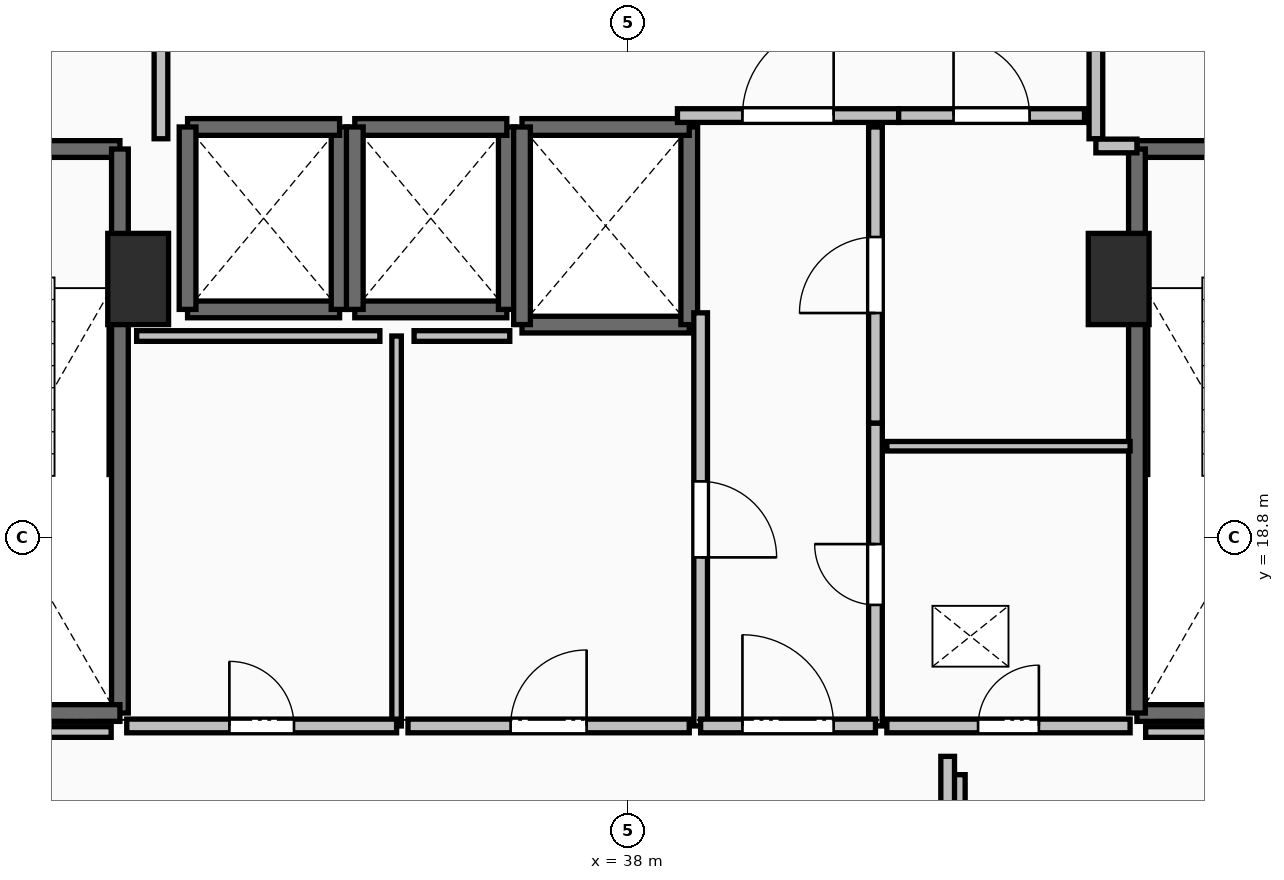
"""IFC4 building model, lengths in metres.
Left out: names, types, materials, properties, quantities, classifications, styles, units other than length and angle.
Written with IfcOpenShell. Run it as: python <this file> out.ifc"""

import sys

from ifc_helpers import new_model, si_unit, direction, frame, frame_2d, origin, origin_2d, place, context, subcontext, project, spatial, rectangle, extrude, element, fill, save


model = new_model("IFC4")
c1 = context("Model", 3, precision=1e-05, world=origin(), true_north=direction((0.0, 1.0)))
c2 = subcontext(c1, "Body", "Model", "MODEL_VIEW")
j1 = project(units=[si_unit("LENGTHUNIT", "METRE"), si_unit("PLANEANGLEUNIT", "RADIAN")], contexts=[c1])
p1 = place(None, origin())
s1 = spatial("IfcSite", under=j1, at=p1, CompositionType="ELEMENT")
p2 = place(p1, origin())
s2 = spatial("IfcBuilding", under=s1, at=p2, CompositionType="ELEMENT")
p3 = place(p2, frame((0.0, 0.0, 45.0)))
s3 = spatial("IfcBuildingStorey", under=s2, at=p3, CompositionType="ELEMENT", Elevation=45.0)
for number, where, z_axis, x_axis in (
    (1, (31.55, 22.2, 0.0), (0.0, 0.0, 1.0), (1.0, 0.0, 0.0)),
    (2, (44.45, 22.2, 0.0), (0.0, 0.0, 1.0), (1.0, 0.0, 0.0)),
):
    element("IfcColumn", number, at=place(p3, frame(where, z_axis=z_axis, x_axis=x_axis)), inside=s3, PredefinedType="PILASTER", context=c2, shape_type="SweptSolid", body=[
        extrude(rectangle(XDim=0.8, YDim=1.2, at=origin_2d()), origin(), (0.0, 0.0, 1.0), 3.5),
    ])
p4 = place(p3, frame((27.94, 23.91, 0.0), z_axis=(0.0, 0.0, 1.0), x_axis=(1.0, 0.0, 0.0)))
e3 = element("IfcWall", 3, at=p4, inside=s3, PredefinedType="SOLIDWALL", context=c2, shape_type="SweptSolid", body=[
    extrude(rectangle(XDim=3.37, YDim=0.22, at=frame_2d((1.685, 0.0))), origin(), (0.0, 0.0, 1.0), 3.24),
])
p5 = place(p4, frame((1.135, 0.0, 0.0)))
e4 = element("IfcOpeningElement", 4, at=p5, cuts=e3, PredefinedType="OPENING", context=c2, shape_type="SweptSolid", body=[
    extrude(rectangle(XDim=1.1, YDim=2.15, at=frame_2d((0.55, 1.075))), frame((0.0, 0.125, 0.0), z_axis=(0.0, -1.0, 0.0), x_axis=(1.0, 0.0, 0.0)), (0.0, 0.0, 1.0), 0.25),
])
p6 = place(p3, frame((31.31, 23.91, 0.0), z_axis=(0.0, 0.0, 1.0), x_axis=(0.0, -1.0, 0.0)))
e5 = element("IfcWall", 5, at=p6, inside=s3, PredefinedType="SOLIDWALL", context=c2, shape_type="SweptSolid", body=[
    extrude(rectangle(XDim=7.42, YDim=0.22, at=frame_2d((3.71, 0.0))), origin(), (0.0, 0.0, 1.0), 3.24),
])
p7 = place(p3, frame((31.31, 16.49, 0.0), z_axis=(0.0, 0.0, 1.0), x_axis=(-1.0, 0.0, 0.0)))
e6 = element("IfcWall", 6, at=p7, inside=s3, PredefinedType="SOLIDWALL", context=c2, shape_type="SweptSolid", body=[
    extrude(rectangle(XDim=3.37, YDim=0.22, at=frame_2d((1.685, 0.0))), origin(), (0.0, 0.0, 1.0), 3.24),
])
p8 = place(p3, frame((44.69, 23.91, 0.0), z_axis=(0.0, 0.0, 1.0), x_axis=(1.0, 0.0, 0.0)))
e7 = element("IfcWall", 7, at=p8, inside=s3, PredefinedType="SOLIDWALL", context=c2, shape_type="SweptSolid", body=[
    extrude(rectangle(XDim=3.37, YDim=0.22, at=frame_2d((1.685, 0.0))), origin(), (0.0, 0.0, 1.0), 3.24),
])
p9 = place(p8, frame((1.135, 0.0, 0.0)))
e8 = element("IfcOpeningElement", 8, at=p9, cuts=e7, PredefinedType="OPENING", context=c2, shape_type="SweptSolid", body=[
    extrude(rectangle(XDim=1.1, YDim=2.15, at=frame_2d((0.55, 1.075))), frame((0.0, 0.125, 0.0), z_axis=(0.0, -1.0, 0.0), x_axis=(1.0, 0.0, 0.0)), (0.0, 0.0, 1.0), 0.25),
])
p10 = place(p3, frame((48.06, 16.49, 0.0), z_axis=(0.0, 0.0, 1.0), x_axis=(-1.0, 0.0, 0.0)))
e9 = element("IfcWall", 9, at=p10, inside=s3, PredefinedType="SOLIDWALL", context=c2, shape_type="SweptSolid", body=[
    extrude(rectangle(XDim=3.37, YDim=0.22, at=frame_2d((1.685, 0.0))), origin(), (0.0, 0.0, 1.0), 3.24),
])
p11 = place(p3, frame((44.69, 16.49, 0.0), z_axis=(0.0, 0.0, 1.0), x_axis=(0.0, 1.0, 0.0)))
e10 = element("IfcWall", 10, at=p11, inside=s3, PredefinedType="SOLIDWALL", context=c2, shape_type="SweptSolid", body=[
    extrude(rectangle(XDim=7.42, YDim=0.22, at=frame_2d((3.71, 0.0))), origin(), (0.0, 0.0, 1.0), 3.24),
])
p12 = place(p3, frame((32.2, 21.8, 0.0), z_axis=(0.0, 0.0, 1.0), x_axis=(1.0, 0.0, 0.0)))
e11 = element("IfcWall", 11, at=p12, inside=s3, PredefinedType="SOLIDWALL", context=c2, shape_type="SweptSolid", body=[
    extrude(rectangle(XDim=2.0, YDim=0.22, at=frame_2d((1.0, 0.0))), origin(), (0.0, 0.0, 1.0), 3.24),
])
p13 = place(p3, frame((34.2, 21.8, 0.0), z_axis=(0.0, 0.0, 1.0), x_axis=(0.0, 1.0, 0.0)))
e12 = element("IfcWall", 12, at=p13, inside=s3, PredefinedType="SOLIDWALL", context=c2, shape_type="SweptSolid", body=[
    extrude(rectangle(XDim=2.4, YDim=0.22, at=frame_2d((1.2, 0.0))), origin(), (0.0, 0.0, 1.0), 3.24),
])
p14 = place(p3, frame((34.2, 24.2, 0.0), z_axis=(0.0, 0.0, 1.0), x_axis=(-1.0, 0.0, 0.0)))
e13 = element("IfcWall", 13, at=p14, inside=s3, PredefinedType="SOLIDWALL", context=c2, shape_type="SweptSolid", body=[
    extrude(rectangle(XDim=2.0, YDim=0.22, at=frame_2d((1.0, 0.0))), origin(), (0.0, 0.0, 1.0), 3.24),
])
p15 = place(p3, frame((32.2, 24.2, 0.0), z_axis=(0.0, 0.0, 1.0), x_axis=(0.0, -1.0, 0.0)))
e14 = element("IfcWall", 14, at=p15, inside=s3, PredefinedType="SOLIDWALL", context=c2, shape_type="SweptSolid", body=[
    extrude(rectangle(XDim=2.4, YDim=0.22, at=frame_2d((1.2, 0.0))), origin(), (0.0, 0.0, 1.0), 3.24),
])
p16 = place(p3, frame((34.4, 21.8, 0.0), z_axis=(0.0, 0.0, 1.0), x_axis=(1.0, 0.0, 0.0)))
e15 = element("IfcWall", 15, at=p16, inside=s3, PredefinedType="SOLIDWALL", context=c2, shape_type="SweptSolid", body=[
    extrude(rectangle(XDim=2.0, YDim=0.22, at=frame_2d((1.0, 0.0))), origin(), (0.0, 0.0, 1.0), 3.24),
])
p17 = place(p3, frame((36.4, 21.8, 0.0), z_axis=(0.0, 0.0, 1.0), x_axis=(0.0, 1.0, 0.0)))
e16 = element("IfcWall", 16, at=p17, inside=s3, PredefinedType="SOLIDWALL", context=c2, shape_type="SweptSolid", body=[
    extrude(rectangle(XDim=2.4, YDim=0.22, at=frame_2d((1.2, 0.0))), origin(), (0.0, 0.0, 1.0), 3.24),
])
p18 = place(p3, frame((36.4, 24.2, 0.0), z_axis=(0.0, 0.0, 1.0), x_axis=(-1.0, 0.0, 0.0)))
e17 = element("IfcWall", 17, at=p18, inside=s3, PredefinedType="SOLIDWALL", context=c2, shape_type="SweptSolid", body=[
    extrude(rectangle(XDim=2.0, YDim=0.22, at=frame_2d((1.0, 0.0))), origin(), (0.0, 0.0, 1.0), 3.24),
])
p19 = place(p3, frame((34.4, 24.2, 0.0), z_axis=(0.0, 0.0, 1.0), x_axis=(0.0, -1.0, 0.0)))
e18 = element("IfcWall", 18, at=p19, inside=s3, PredefinedType="SOLIDWALL", context=c2, shape_type="SweptSolid", body=[
    extrude(rectangle(XDim=2.4, YDim=0.22, at=frame_2d((1.2, 0.0))), origin(), (0.0, 0.0, 1.0), 3.24),
])
p20 = place(p3, frame((36.6, 21.6, 0.0), z_axis=(0.0, 0.0, 1.0), x_axis=(1.0, 0.0, 0.0)))
e19 = element("IfcWall", 19, at=p20, inside=s3, PredefinedType="SOLIDWALL", context=c2, shape_type="SweptSolid", body=[
    extrude(rectangle(XDim=2.2, YDim=0.22, at=frame_2d((1.1, 0.0))), origin(), (0.0, 0.0, 1.0), 3.24),
])
p21 = place(p3, frame((38.8, 21.6, 0.0), z_axis=(0.0, 0.0, 1.0), x_axis=(0.0, 1.0, 0.0)))
e20 = element("IfcWall", 20, at=p21, inside=s3, PredefinedType="SOLIDWALL", context=c2, shape_type="SweptSolid", body=[
    extrude(rectangle(XDim=2.6, YDim=0.22, at=frame_2d((1.3, 0.0))), origin(), (0.0, 0.0, 1.0), 3.24),
])
p22 = place(p3, frame((38.8, 24.2, 0.0), z_axis=(0.0, 0.0, 1.0), x_axis=(-1.0, 0.0, 0.0)))
e21 = element("IfcWall", 21, at=p22, inside=s3, PredefinedType="SOLIDWALL", context=c2, shape_type="SweptSolid", body=[
    extrude(rectangle(XDim=2.2, YDim=0.22, at=frame_2d((1.1, 0.0))), origin(), (0.0, 0.0, 1.0), 3.24),
])
p23 = place(p3, frame((36.6, 24.2, 0.0), z_axis=(0.0, 0.0, 1.0), x_axis=(0.0, -1.0, 0.0)))
e22 = element("IfcWall", 22, at=p23, inside=s3, PredefinedType="SOLIDWALL", context=c2, shape_type="SweptSolid", body=[
    extrude(rectangle(XDim=2.6, YDim=0.22, at=frame_2d((1.3, 0.0))), origin(), (0.0, 0.0, 1.0), 3.24),
])
p24 = place(p3, frame((31.85, 24.045, 0.0), z_axis=(0.0, 0.0, 1.0), x_axis=(0.0, 1.0, 0.0)))
e23 = element("IfcWall", 23, at=p24, inside=s3, PredefinedType="PARTITIONING", context=c2, shape_type="SweptSolid", body=[
    extrude(rectangle(XDim=3.91, YDim=0.18, at=frame_2d((1.955, 0.0))), origin(), (0.0, 0.0, 1.0), 3.24),
])
p25 = place(p24, frame((1.355, 0.0, 0.0)))
e24 = element("IfcOpeningElement", 24, at=p25, cuts=e23, PredefinedType="OPENING", context=c2, shape_type="SweptSolid", body=[
    extrude(rectangle(XDim=1.2, YDim=2.15, at=frame_2d((0.6, 1.075))), frame((0.0, 0.105, 0.0), z_axis=(0.0, -1.0, 0.0), x_axis=(1.0, 0.0, 0.0)), (0.0, 0.0, 1.0), 0.21),
])
p26 = place(p3, frame((44.15, 27.955, 0.0), z_axis=(0.0, 0.0, 1.0), x_axis=(0.0, -1.0, 0.0)))
e25 = element("IfcWall", 25, at=p26, inside=s3, PredefinedType="PARTITIONING", context=c2, shape_type="SweptSolid", body=[
    extrude(rectangle(XDim=3.91, YDim=0.18, at=frame_2d((1.955, 0.0))), origin(), (0.0, 0.0, 1.0), 3.24),
])
p27 = place(p26, frame((1.355, 0.0, 0.0)))
e26 = element("IfcOpeningElement", 26, at=p27, cuts=e25, PredefinedType="OPENING", context=c2, shape_type="SweptSolid", body=[
    extrude(rectangle(XDim=1.2, YDim=2.15, at=frame_2d((0.6, 1.075))), frame((0.0, 0.105, 0.0), z_axis=(0.0, -1.0, 0.0), x_axis=(1.0, 0.0, 0.0)), (0.0, 0.0, 1.0), 0.21),
])
p28 = place(p3, frame((44.15, 23.95, 0.0), z_axis=(0.0, 0.0, 1.0), x_axis=(1.0, 0.0, 0.0)))
e27 = element("IfcWall", 27, at=p28, inside=s3, PredefinedType="PARTITIONING", context=c2, shape_type="SweptSolid", body=[
    extrude(rectangle(XDim=0.54, YDim=0.18, at=frame_2d((0.27, 0.0))), origin(), (0.0, 0.0, 1.0), 3.24),
])
p29 = place(p3, frame((38.645, 24.35, 0.0), z_axis=(0.0, 0.0, 1.0), x_axis=(1.0, 0.0, 0.0)))
e28 = element("IfcWall", 28, at=p29, inside=s3, PredefinedType="PARTITIONING", context=c2, shape_type="SweptSolid", body=[
    extrude(rectangle(XDim=2.91, YDim=0.18, at=frame_2d((1.455, 0.0))), origin(), (0.0, 0.0, 1.0), 3.24),
])
p30 = place(p29, frame((0.855, 0.0, 0.0)))
e29 = element("IfcOpeningElement", 29, at=p30, cuts=e28, PredefinedType="OPENING", context=c2, shape_type="SweptSolid", body=[
    extrude(rectangle(XDim=1.2, YDim=2.15, at=frame_2d((0.6, 1.075))), frame((0.0, 0.105, 0.0), z_axis=(0.0, -1.0, 0.0), x_axis=(1.0, 0.0, 0.0)), (0.0, 0.0, 1.0), 0.21),
])
p31 = place(p3, frame((41.555, 24.35, 0.0), z_axis=(0.0, 0.0, 1.0), x_axis=(1.0, 0.0, 0.0)))
e30 = element("IfcWall", 30, at=p31, inside=s3, PredefinedType="PARTITIONING", context=c2, shape_type="SweptSolid", body=[
    extrude(rectangle(XDim=2.445, YDim=0.18, at=frame_2d((1.223, 0.0))), origin(), (0.0, 0.0, 1.0), 3.24),
])
p32 = place(p31, frame((0.722, 0.0, 0.0)))
e31 = element("IfcOpeningElement", 31, at=p32, cuts=e30, PredefinedType="OPENING", context=c2, shape_type="SweptSolid", body=[
    extrude(rectangle(XDim=1.0, YDim=2.15, at=frame_2d((0.5, 1.075))), frame((0.0, 0.105, 0.0), z_axis=(0.0, -1.0, 0.0), x_axis=(1.0, 0.0, 0.0)), (0.0, 0.0, 1.0), 0.21),
])
p33 = place(p3, frame((41.25, 16.32, 0.0), z_axis=(0.0, 0.0, 1.0), x_axis=(0.0, 1.0, 0.0)))
e32 = element("IfcWall", 32, at=p33, inside=s3, PredefinedType="PARTITIONING", context=c2, shape_type="SweptSolid", body=[
    extrude(rectangle(XDim=3.985, YDim=0.18, at=frame_2d((1.992, 0.0))), origin(), (0.0, 0.0, 1.0), 3.24),
])
p34 = place(p33, frame((1.593, 0.0, 0.0)))
e33 = element("IfcOpeningElement", 33, at=p34, cuts=e32, PredefinedType="OPENING", context=c2, shape_type="SweptSolid", body=[
    extrude(rectangle(XDim=0.8, YDim=2.05, at=frame_2d((0.4, 1.025))), frame((0.0, 0.105, 0.0), z_axis=(0.0, -1.0, 0.0), x_axis=(1.0, 0.0, 0.0)), (0.0, 0.0, 1.0), 0.21),
])
p35 = place(p3, frame((41.25, 20.305, 0.0), z_axis=(0.0, 0.0, 1.0), x_axis=(0.0, 1.0, 0.0)))
e34 = element("IfcWall", 34, at=p35, inside=s3, PredefinedType="PARTITIONING", context=c2, shape_type="SweptSolid", body=[
    extrude(rectangle(XDim=3.895, YDim=0.18, at=frame_2d((1.948, 0.0))), origin(), (0.0, 0.0, 1.0), 3.24),
])
p36 = place(p35, frame((1.448, 0.0, 0.0)))
e35 = element("IfcOpeningElement", 35, at=p36, cuts=e34, PredefinedType="OPENING", context=c2, shape_type="SweptSolid", body=[
    extrude(rectangle(XDim=1.0, YDim=2.15, at=frame_2d((0.5, 1.075))), frame((0.0, 0.105, 0.0), z_axis=(0.0, -1.0, 0.0), x_axis=(1.0, 0.0, 0.0)), (0.0, 0.0, 1.0), 0.21),
])
p37 = place(p3, frame((38.95, 21.755, 0.0), z_axis=(0.0, 0.0, 1.0), x_axis=(0.0, -1.0, 0.0)))
e36 = element("IfcWall", 36, at=p37, inside=s3, PredefinedType="PARTITIONING", context=c2, shape_type="SweptSolid", body=[
    extrude(rectangle(XDim=5.435, YDim=0.18, at=frame_2d((2.717, 0.0))), origin(), (0.0, 0.0, 1.0), 3.24),
])
p38 = place(p37, frame((2.218, 0.0, 0.0)))
e37 = element("IfcOpeningElement", 37, at=p38, cuts=e36, PredefinedType="OPENING", context=c2, shape_type="SweptSolid", body=[
    extrude(rectangle(XDim=1.0, YDim=2.15, at=frame_2d((0.5, 1.075))), frame((0.0, 0.105, 0.0), z_axis=(0.0, -1.0, 0.0), x_axis=(1.0, 0.0, 0.0)), (0.0, 0.0, 1.0), 0.21),
])
p39 = place(p3, frame((38.95, 16.32, 0.0), z_axis=(0.0, 0.0, 1.0), x_axis=(1.0, 0.0, 0.0)))
e38 = element("IfcWall", 38, at=p39, inside=s3, PredefinedType="PARTITIONING", context=c2, shape_type="SweptSolid", body=[
    extrude(rectangle(XDim=2.3, YDim=0.18, at=frame_2d((1.15, 0.0))), origin(), (0.0, 0.0, 1.0), 3.24),
])
p40 = place(p39, frame((0.55, 0.0, 0.0)))
e39 = element("IfcOpeningElement", 39, at=p40, cuts=e38, PredefinedType="OPENING", context=c2, shape_type="SweptSolid", body=[
    extrude(rectangle(XDim=1.2, YDim=2.15, at=frame_2d((0.6, 1.075))), frame((0.0, 0.105, 0.0), z_axis=(0.0, -1.0, 0.0), x_axis=(1.0, 0.0, 0.0)), (0.0, 0.0, 1.0), 0.21),
])
p41 = place(p3, frame((44.6, 20.0, 0.0), z_axis=(0.0, 0.0, 1.0), x_axis=(-1.0, 0.0, 0.0)))
e40 = element("IfcWall", 40, at=p41, inside=s3, PredefinedType="PARTITIONING", context=c2, shape_type="SweptSolid", body=[
    extrude(rectangle(XDim=3.2, YDim=0.125, at=frame_2d((1.6, 0.0))), origin(), (0.0, 0.0, 1.0), 3.24),
])
p42 = place(p3, frame((41.4, 16.32, 0.0), z_axis=(0.0, 0.0, 1.0), x_axis=(1.0, 0.0, 0.0)))
e41 = element("IfcWall", 41, at=p42, inside=s3, PredefinedType="PARTITIONING", context=c2, shape_type="SweptSolid", body=[
    extrude(rectangle(XDim=3.2, YDim=0.18, at=frame_2d((1.6, 0.0))), origin(), (0.0, 0.0, 1.0), 3.24),
])
p43 = place(p42, frame((1.2, 0.0, 0.0)))
e42 = element("IfcOpeningElement", 42, at=p43, cuts=e41, PredefinedType="OPENING", context=c2, shape_type="SweptSolid", body=[
    extrude(rectangle(XDim=0.8, YDim=2.05, at=frame_2d((0.4, 1.025))), frame((0.0, 0.105, 0.0), z_axis=(0.0, -1.0, 0.0), x_axis=(1.0, 0.0, 0.0)), (0.0, 0.0, 1.0), 0.21),
])
p44 = place(p3, frame((34.95, 16.32, 0.0), z_axis=(0.0, 0.0, 1.0), x_axis=(0.0, 1.0, 0.0)))
e43 = element("IfcWall", 43, at=p44, inside=s3, PredefinedType="PARTITIONING", context=c2, shape_type="SweptSolid", body=[
    extrude(rectangle(XDim=5.13, YDim=0.125, at=frame_2d((2.565, 0.0))), origin(), (0.0, 0.0, 1.0), 3.24),
])
p45 = place(p3, frame((31.4, 16.32, 0.0), z_axis=(0.0, 0.0, 1.0), x_axis=(1.0, 0.0, 0.0)))
e44 = element("IfcWall", 44, at=p45, inside=s3, PredefinedType="PARTITIONING", context=c2, shape_type="SweptSolid", body=[
    extrude(rectangle(XDim=3.55, YDim=0.18, at=frame_2d((1.775, 0.0))), origin(), (0.0, 0.0, 1.0), 3.24),
])
p46 = place(p45, frame((1.35, 0.0, 0.0)))
e45 = element("IfcOpeningElement", 45, at=p46, cuts=e44, PredefinedType="OPENING", context=c2, shape_type="SweptSolid", body=[
    extrude(rectangle(XDim=0.85, YDim=2.1, at=frame_2d((0.425, 1.05))), frame((0.0, 0.105, 0.0), z_axis=(0.0, -1.0, 0.0), x_axis=(1.0, 0.0, 0.0)), (0.0, 0.0, 1.0), 0.21),
])
p47 = place(p3, frame((35.1, 16.32, 0.0), z_axis=(0.0, 0.0, 1.0), x_axis=(1.0, 0.0, 0.0)))
e46 = element("IfcWall", 46, at=p47, inside=s3, PredefinedType="PARTITIONING", context=c2, shape_type="SweptSolid", body=[
    extrude(rectangle(XDim=3.7, YDim=0.18, at=frame_2d((1.85, 0.0))), origin(), (0.0, 0.0, 1.0), 3.24),
])
p48 = place(p47, frame((1.35, 0.0, 0.0)))
e47 = element("IfcOpeningElement", 47, at=p48, cuts=e46, PredefinedType="OPENING", context=c2, shape_type="SweptSolid", body=[
    extrude(rectangle(XDim=1.0, YDim=2.15, at=frame_2d((0.5, 1.075))), frame((0.0, 0.105, 0.0), z_axis=(0.0, -1.0, 0.0), x_axis=(1.0, 0.0, 0.0)), (0.0, 0.0, 1.0), 0.21),
])
p49 = place(p3, frame((42.34, 15.679, 0.0), z_axis=(0.0, 0.0, 1.0), x_axis=(0.0, -1.0, 0.0)))
e48 = element("IfcWall", 48, at=p49, inside=s3, PredefinedType="PARTITIONING", context=c2, shape_type="SweptSolid", body=[
    extrude(rectangle(XDim=1.579, YDim=0.18, at=frame_2d((0.79, 0.0))), origin(), (0.0, 0.0, 1.0), 3.24),
])
p50 = place(p3, frame((42.2, 14.1, 0.0), z_axis=(0.0, 0.0, 1.0), x_axis=(0.0, 1.0, 0.0)))
e49 = element("IfcWall", 49, at=p50, inside=s3, PredefinedType="PARTITIONING", context=c2, shape_type="SweptSolid", body=[
    extrude(rectangle(XDim=1.82, YDim=0.18, at=frame_2d((0.91, 0.0))), origin(), (0.0, 0.0, 1.0), 3.24),
])
p51 = place(p3, frame((34.73, 21.45, 0.0), z_axis=(0.0, 0.0, 1.0), x_axis=(-1.0, 0.0, 0.0)))
e50 = element("IfcWall", 50, at=p51, inside=s3, PredefinedType="PARTITIONING", context=c2, shape_type="SweptSolid", body=[
    extrude(rectangle(XDim=3.2, YDim=0.14, at=frame_2d((1.6, 0.0))), origin(), (0.0, 0.0, 1.0), 3.24),
])
p52 = place(p3, frame((36.439, 21.45, 0.0), z_axis=(0.0, 0.0, 1.0), x_axis=(-1.0, 0.0, 0.0)))
e51 = element("IfcWall", 51, at=p52, inside=s3, PredefinedType="PARTITIONING", context=c2, shape_type="SweptSolid", body=[
    extrude(rectangle(XDim=1.259, YDim=0.14, at=frame_2d((0.629, 0.0))), origin(), (0.0, 0.0, 1.0), 3.24),
])
for number, where, z_axis, x_axis in (
    (52, (48.55, 16.24, 0.0), (0.0, 0.0, 1.0), (-1.0, 0.0, 0.0)),
    (53, (31.195, 16.24, 0.0), (0.0, 0.0, 1.0), (-1.0, 0.0, 0.0)),
):
    element("IfcWall", number, at=place(p3, frame(where, z_axis=z_axis, x_axis=x_axis)), inside=s3, PredefinedType="PARTITIONING", context=c2, shape_type="SweptSolid", body=[
        extrude(rectangle(XDim=3.745, YDim=0.14, at=frame_2d((1.873, 0.0))), origin(), (0.0, 0.0, 1.0), 2.432),
    ])
p53 = place(p30, origin())
e54 = element("IfcDoor", 54, at=p53, inside=s3, OperationType="SINGLE_SWING_RIGHT", PredefinedType="DOOR", context=c2, shape_type="SweptSolid", body=[
    extrude(rectangle(XDim=1.2, YDim=2.15, at=frame_2d((0.6, 1.075))), frame((0.0, 0.025, 0.0), z_axis=(0.0, -1.0, 0.0), x_axis=(1.0, 0.0, 0.0)), (0.0, 0.0, 1.0), 0.05),
])
fill(e29, e54)
p54 = place(p32, origin())
e55 = element("IfcDoor", 55, at=p54, inside=s3, OperationType="SINGLE_SWING_LEFT", PredefinedType="DOOR", context=c2, shape_type="SweptSolid", body=[
    extrude(rectangle(XDim=1.0, YDim=2.15, at=frame_2d((0.5, 1.075))), frame((0.0, 0.025, 0.0), z_axis=(0.0, -1.0, 0.0), x_axis=(1.0, 0.0, 0.0)), (0.0, 0.0, 1.0), 0.05),
])
fill(e31, e55)
p55 = place(p34, origin())
e56 = element("IfcDoor", 56, at=p55, inside=s3, OperationType="SINGLE_SWING_RIGHT", PredefinedType="DOOR", context=c2, shape_type="SweptSolid", body=[
    extrude(rectangle(XDim=0.8, YDim=2.05, at=frame_2d((0.4, 1.025))), frame((0.0, 0.025, 0.0), z_axis=(0.0, -1.0, 0.0), x_axis=(1.0, 0.0, 0.0)), (0.0, 0.0, 1.0), 0.05),
])
fill(e33, e56)
p56 = place(p36, origin())
e57 = element("IfcDoor", 57, at=p56, inside=s3, OperationType="SINGLE_SWING_LEFT", PredefinedType="DOOR", context=c2, shape_type="SweptSolid", body=[
    extrude(rectangle(XDim=1.0, YDim=2.15, at=frame_2d((0.5, 1.075))), frame((0.0, 0.025, 0.0), z_axis=(0.0, -1.0, 0.0), x_axis=(1.0, 0.0, 0.0)), (0.0, 0.0, 1.0), 0.05),
])
fill(e35, e57)
p57 = place(p38, origin())
e58 = element("IfcDoor", 58, at=p57, inside=s3, OperationType="SINGLE_SWING_RIGHT", PredefinedType="DOOR", context=c2, shape_type="SweptSolid", body=[
    extrude(rectangle(XDim=1.0, YDim=2.15, at=frame_2d((0.5, 1.075))), frame((0.0, 0.025, 0.0), z_axis=(0.0, -1.0, 0.0), x_axis=(1.0, 0.0, 0.0)), (0.0, 0.0, 1.0), 0.05),
])
fill(e37, e58)
p58 = place(p40, origin())
e59 = element("IfcDoor", 59, at=p58, inside=s3, OperationType="SINGLE_SWING_LEFT", PredefinedType="DOOR", context=c2, shape_type="SweptSolid", body=[
    extrude(rectangle(XDim=1.2, YDim=2.15, at=frame_2d((0.6, 1.075))), frame((0.0, 0.025, 0.0), z_axis=(0.0, -1.0, 0.0), x_axis=(1.0, 0.0, 0.0)), (0.0, 0.0, 1.0), 0.05),
])
fill(e39, e59)
p59 = place(p43, origin())
e60 = element("IfcDoor", 60, at=p59, inside=s3, OperationType="SINGLE_SWING_RIGHT", PredefinedType="DOOR", context=c2, shape_type="SweptSolid", body=[
    extrude(rectangle(XDim=0.8, YDim=2.05, at=frame_2d((0.4, 1.025))), frame((0.0, 0.025, 0.0), z_axis=(0.0, -1.0, 0.0), x_axis=(1.0, 0.0, 0.0)), (0.0, 0.0, 1.0), 0.05),
])
fill(e42, e60)
p60 = place(p46, origin())
e61 = element("IfcDoor", 61, at=p60, inside=s3, OperationType="SINGLE_SWING_LEFT", PredefinedType="DOOR", context=c2, shape_type="SweptSolid", body=[
    extrude(rectangle(XDim=0.85, YDim=2.1, at=frame_2d((0.425, 1.05))), frame((0.0, 0.025, 0.0), z_axis=(0.0, -1.0, 0.0), x_axis=(1.0, 0.0, 0.0)), (0.0, 0.0, 1.0), 0.05),
])
fill(e45, e61)
p61 = place(p48, origin())
e62 = element("IfcDoor", 62, at=p61, inside=s3, OperationType="SINGLE_SWING_RIGHT", PredefinedType="DOOR", context=c2, shape_type="SweptSolid", body=[
    extrude(rectangle(XDim=1.0, YDim=2.15, at=frame_2d((0.5, 1.075))), frame((0.0, 0.025, 0.0), z_axis=(0.0, -1.0, 0.0), x_axis=(1.0, 0.0, 0.0)), (0.0, 0.0, 1.0), 0.05),
])
fill(e47, e62)
save(model, sys.argv[1])
